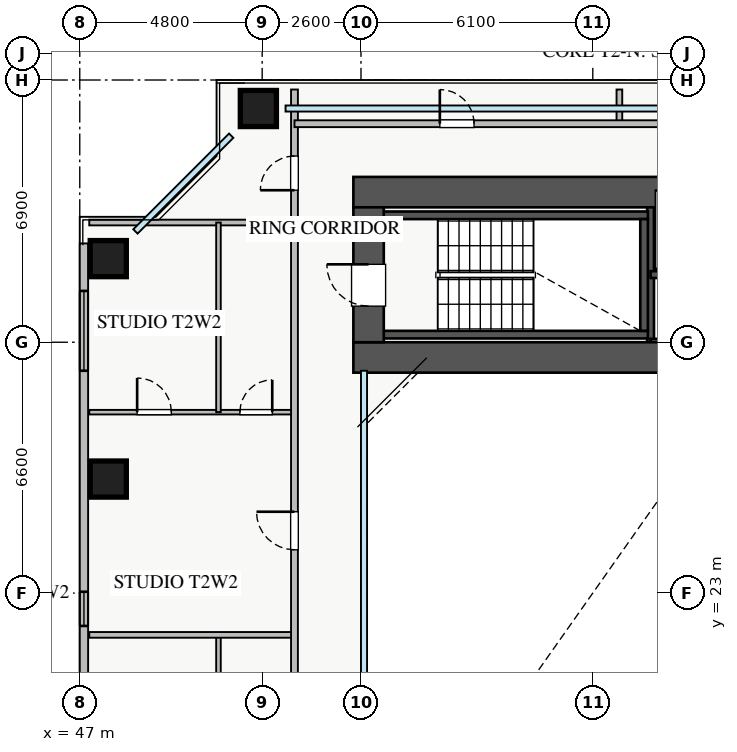
"""IFC4 building model, lengths in metres.
Left out: names, types, materials, properties, quantities, classifications, styles, units other than length and angle.
Written with IfcOpenShell. Run it as: python <this file> out.ifc"""

import sys

from ifc_helpers import new_model, si_unit, direction, frame, frame_2d, origin, origin_2d, place, context, subcontext, project, spatial, rectangle, extrude, source, transform, mapped, element, fill, save


model = new_model("IFC4")
c1 = context("Model", 3, precision=1e-05, world=origin(), true_north=direction((0.0, 1.0)))
c2 = subcontext(c1, "Body", "Model", "MODEL_VIEW")
j1 = project(units=[si_unit("LENGTHUNIT", "METRE"), si_unit("PLANEANGLEUNIT", "RADIAN")], contexts=[c1])
p1 = place(None, origin())
s1 = spatial("IfcSite", under=j1, at=p1, CompositionType="ELEMENT")
p2 = place(p1, origin())
s2 = spatial("IfcBuilding", under=s1, at=p2, CompositionType="ELEMENT")
p3 = place(p2, frame((0.0, 0.0, 26.25)))
s3 = spatial("IfcBuildingStorey", under=s2, at=p3, CompositionType="ELEMENT", Elevation=26.25)
p4 = place(p3, frame((62.02, 29.6, 0.0), z_axis=(0.0, 0.0, 1.0), x_axis=(0.0, 1.0, 0.0)))
e1 = element("IfcWall", 1, at=p4, inside=s3, PredefinedType="SHEAR", context=c2, shape_type="SweptSolid", body=[
    extrude(rectangle(XDim=3.95, YDim=0.18, at=frame_2d((1.975, 0.0))), origin(), (0.0, 0.0, 1.0), 3.07),
])
for number, where, z_axis, x_axis in (
    (2, (62.02, 31.38, 0.0), (0.0, 0.0, 1.0), (1.0, 0.0, 0.0)),
    (3, (62.02, 29.6, 0.0), (0.0, 0.0, 1.0), (1.0, 0.0, 0.0)),
):
    element("IfcWall", number, at=place(p3, frame(where, z_axis=z_axis, x_axis=x_axis)), inside=s3, PredefinedType="SHEAR", context=c2, shape_type="SweptSolid", body=[
        extrude(rectangle(XDim=1.86, YDim=0.18, at=frame_2d((0.93, 0.0))), origin(), (0.0, 0.0, 1.0), 3.07),
    ])
for number, where, z_axis, x_axis in (
    (4, (54.8, 29.8, 0.0), (0.0, 0.0, 1.0), (1.0, 0.0, 0.0)),
    (5, (54.8, 32.94, 0.0), (0.0, 0.0, 1.0), (1.0, 0.0, 0.0)),
):
    element("IfcWall", number, at=place(p3, frame(where, z_axis=z_axis, x_axis=x_axis)), inside=s3, PredefinedType="SHEAR", context=c2, shape_type="SweptSolid", body=[
        extrude(rectangle(XDim=7.15, YDim=0.2, at=frame_2d((3.575, 0.0))), origin(), (0.0, 0.0, 1.0), 3.25),
    ])
p5 = place(p3, frame((61.85, 29.9, 0.0), z_axis=(0.0, 0.0, 1.0), x_axis=(0.0, 1.0, 0.0)))
e6 = element("IfcWall", 6, at=p5, inside=s3, PredefinedType="SHEAR", context=c2, shape_type="SweptSolid", body=[
    extrude(rectangle(XDim=2.94, YDim=0.2, at=frame_2d((1.47, 0.0))), origin(), (0.0, 0.0, 1.0), 3.25),
])
p6 = place(p3, frame((54.2, 29.2, 0.0), z_axis=(0.0, 0.0, 1.0), x_axis=(1.0, 0.0, 0.0)))
e7 = element("IfcWall", 7, at=p6, inside=s3, PredefinedType="SHEAR", context=c2, shape_type="SweptSolid", body=[
    extrude(rectangle(XDim=12.6, YDim=0.8, at=frame_2d((6.3, 0.0))), origin(), (0.0, 0.0, 1.0), 3.25),
])
p7 = place(p3, frame((54.2, 33.55, 0.0), z_axis=(0.0, 0.0, 1.0), x_axis=(1.0, 0.0, 0.0)))
e8 = element("IfcWall", 8, at=p7, inside=s3, PredefinedType="SHEAR", context=c2, shape_type="SweptSolid", body=[
    extrude(rectangle(XDim=12.6, YDim=0.8, at=frame_2d((6.3, 0.0))), origin(), (0.0, 0.0, 1.0), 3.25),
])
p8 = place(p7, frame((8.2, 0.0, 0.0)))
e9 = element("IfcOpeningElement", 9, at=p8, cuts=e8, PredefinedType="OPENING", context=c2, shape_type="SweptSolid", body=[
    extrude(rectangle(XDim=1.1, YDim=2.05, at=frame_2d((0.55, 1.025))), frame((0.0, 0.41, 0.0), z_axis=(0.0, -1.0, 0.0), x_axis=(1.0, 0.0, 0.0)), (0.0, 0.0, 1.0), 0.82),
])
p9 = place(p3, frame((54.6, 29.6, 0.0), z_axis=(0.0, 0.0, 1.0), x_axis=(0.0, 1.0, 0.0)))
e10 = element("IfcWall", 10, at=p9, inside=s3, PredefinedType="SHEAR", context=c2, shape_type="SweptSolid", body=[
    extrude(rectangle(XDim=3.55, YDim=0.8, at=frame_2d((1.775, 0.0))), origin(), (0.0, 0.0, 1.0), 3.25),
])
p10 = place(p9, frame((0.95, 0.0, 0.0)))
e11 = element("IfcOpeningElement", 11, at=p10, cuts=e10, PredefinedType="OPENING", context=c2, shape_type="SweptSolid", body=[
    extrude(rectangle(XDim=1.1, YDim=2.05, at=frame_2d((0.55, 1.025))), frame((0.0, 0.41, 0.0), z_axis=(0.0, -1.0, 0.0), x_axis=(1.0, 0.0, 0.0)), (0.0, 0.0, 1.0), 0.82),
])
m1 = source(origin(), c2, "Body", "SweptSolid", [
    extrude(rectangle(XDim=0.95, YDim=0.95, at=origin_2d()), origin(), (0.0, 0.0, 1.0), 3.25),
])
for number, where, z_axis, x_axis in (
    (12, (51.7, 35.75, 0.0), (0.0, 0.0, 1.0), (1.0, 0.0, 0.0)),
    (13, (47.75, 26.0, 0.0), (0.0, 0.0, 1.0), (1.0, 0.0, 0.0)),
    (14, (47.75, 31.8, 0.0), (0.0, 0.0, 1.0), (1.0, 0.0, 0.0)),
):
    element("IfcColumn", number, at=place(p3, frame(where, z_axis=z_axis, x_axis=x_axis)), inside=s3, PredefinedType="COLUMN", context=c2, shape_type="MappedRepresentation", body=[
        mapped(m1, transform((0.0, 0.0, 0.0), x_axis=(1.0, 0.0, 0.0), y_axis=(0.0, 1.0, 0.0), z_axis=(0.0, 0.0, 1.0), scale=1.0)),
    ])
p11 = place(p3, frame((47.11, 13.8, 0.0), z_axis=(0.0, 0.0, 1.0), x_axis=(0.0, 1.0, 0.0)))
e15 = element("IfcWall", 15, at=p11, inside=s3, PredefinedType="STANDARD", context=c2, shape_type="SweptSolid", body=[
    extrude(rectangle(XDim=18.4, YDim=0.22, at=frame_2d((9.2, 0.0))), origin(), (0.0, 0.0, 1.0), 2.61),
])
p12 = place(p11, frame((1.1, 0.0, 0.9)))
e16 = element("IfcOpeningElement", 16, at=p12, cuts=e15, PredefinedType="OPENING", context=c2, shape_type="SweptSolid", body=[
    extrude(rectangle(XDim=2.4, YDim=1.48, at=frame_2d((1.2, 0.74))), frame((0.0, 0.12, 0.0), z_axis=(0.0, -1.0, 0.0), x_axis=(1.0, 0.0, 0.0)), (0.0, 0.0, 1.0), 0.24),
])
p13 = place(p11, frame((15.05, 0.0, 0.9)))
e17 = element("IfcOpeningElement", 17, at=p13, cuts=e15, PredefinedType="OPENING", context=c2, shape_type="SweptSolid", body=[
    extrude(rectangle(XDim=2.1, YDim=1.48, at=frame_2d((1.05, 0.74))), frame((0.0, 0.12, 0.0), z_axis=(0.0, -1.0, 0.0), x_axis=(1.0, 0.0, 0.0)), (0.0, 0.0, 1.0), 0.24),
])
p14 = place(p11, frame((8.335, 0.0, 0.9)))
e18 = element("IfcOpeningElement", 18, at=p14, cuts=e15, PredefinedType="OPENING", context=c2, shape_type="SweptSolid", body=[
    extrude(rectangle(XDim=0.9, YDim=1.2, at=frame_2d((0.45, 0.6))), frame((0.0, 0.12, 0.0), z_axis=(0.0, -1.0, 0.0), x_axis=(1.0, 0.0, 0.0)), (0.0, 0.0, 1.0), 0.24),
])
p15 = place(p3, frame((47.25, 32.75, 0.0), z_axis=(0.0, 0.0, 1.0), x_axis=(1.0, 0.0, 0.0)))
e19 = element("IfcWall", 19, at=p15, inside=s3, PredefinedType="PARTITIONING", context=c2, shape_type="SweptSolid", body=[
    extrude(rectangle(XDim=5.4, YDim=0.15, at=frame_2d((2.7, 0.0))), origin(), (0.0, 0.0, 1.0), 3.07),
])
p16 = place(p3, frame((50.65, 17.92, 0.0), z_axis=(0.0, 0.0, 1.0), x_axis=(0.0, 1.0, 0.0)))
e20 = element("IfcWall", 20, at=p16, inside=s3, PredefinedType="PLUMBINGWALL", context=c2, shape_type="SweptSolid", body=[
    extrude(rectangle(XDim=3.98, YDim=0.12, at=frame_2d((1.99, 0.0))), origin(), (0.0, 0.0, 1.0), 3.07),
])
p17 = place(p3, frame((47.25, 27.76, 0.0), z_axis=(0.0, 0.0, 1.0), x_axis=(1.0, 0.0, 0.0)))
e21 = element("IfcWall", 21, at=p17, inside=s3, PredefinedType="PLUMBINGWALL", context=c2, shape_type="SweptSolid", body=[
    extrude(rectangle(XDim=5.4, YDim=0.12, at=frame_2d((2.7, 0.0))), origin(), (0.0, 0.0, 1.0), 3.07),
])
p18 = place(p17, frame((1.26, 0.0, 0.0)))
e22 = element("IfcOpeningElement", 22, at=p18, cuts=e21, PredefinedType="OPENING", context=c2, shape_type="SweptSolid", body=[
    extrude(rectangle(XDim=0.9, YDim=2.05, at=frame_2d((0.45, 1.025))), frame((0.0, 0.07, 0.0), z_axis=(0.0, -1.0, 0.0), x_axis=(1.0, 0.0, 0.0)), (0.0, 0.0, 1.0), 0.14),
])
p19 = place(p17, frame((3.965, 0.0, 0.0)))
e23 = element("IfcOpeningElement", 23, at=p19, cuts=e21, PredefinedType="OPENING", context=c2, shape_type="SweptSolid", body=[
    extrude(rectangle(XDim=0.85, YDim=2.05, at=frame_2d((0.425, 1.025))), frame((0.0, 0.07, 0.0), z_axis=(0.0, -1.0, 0.0), x_axis=(1.0, 0.0, 0.0)), (0.0, 0.0, 1.0), 0.14),
])
p20 = place(p3, frame((50.65, 27.76, 0.0), z_axis=(0.0, 0.0, 1.0), x_axis=(0.0, 1.0, 0.0)))
e24 = element("IfcWall", 24, at=p20, inside=s3, PredefinedType="PLUMBINGWALL", context=c2, shape_type="SweptSolid", body=[
    extrude(rectangle(XDim=4.99, YDim=0.12, at=frame_2d((2.495, 0.0))), origin(), (0.0, 0.0, 1.0), 3.07),
])
p21 = place(p3, frame((47.25, 21.9, 0.0), z_axis=(0.0, 0.0, 1.0), x_axis=(1.0, 0.0, 0.0)))
e25 = element("IfcWall", 25, at=p21, inside=s3, PredefinedType="PARTITIONING", context=c2, shape_type="SweptSolid", body=[
    extrude(rectangle(XDim=5.4, YDim=0.15, at=frame_2d((2.7, 0.0))), origin(), (0.0, 0.0, 1.0), 3.07),
])
p22 = place(p3, frame((52.65, 9.75, 0.0), z_axis=(0.0, 0.0, 1.0), x_axis=(0.0, 1.0, 0.0)))
e26 = element("IfcWall", 26, at=p22, inside=s3, PredefinedType="PARTITIONING", context=c2, shape_type="SweptSolid", body=[
    extrude(rectangle(XDim=26.5, YDim=0.18, at=frame_2d((13.25, 0.0))), origin(), (0.0, 0.0, 1.0), 3.07),
])
p23 = place(p22, frame((23.85, 0.0, 0.0)))
e27 = element("IfcOpeningElement", 27, at=p23, cuts=e26, PredefinedType="OPENING", context=c2, shape_type="SweptSolid", body=[
    extrude(rectangle(XDim=0.9, YDim=2.05, at=frame_2d((0.45, 1.025))), frame((0.0, 0.1, 0.0), z_axis=(0.0, -1.0, 0.0), x_axis=(1.0, 0.0, 0.0)), (0.0, 0.0, 1.0), 0.2),
])
p24 = place(p22, frame((1.75, 0.0, 0.0)))
e28 = element("IfcOpeningElement", 28, at=p24, cuts=e26, PredefinedType="OPENING", context=c2, shape_type="SweptSolid", body=[
    extrude(rectangle(XDim=0.9, YDim=2.05, at=frame_2d((0.45, 1.025))), frame((0.0, 0.1, 0.0), z_axis=(0.0, -1.0, 0.0), x_axis=(1.0, 0.0, 0.0)), (0.0, 0.0, 1.0), 0.2),
])
p25 = place(p22, frame((5.145, 0.0, 0.0)))
e29 = element("IfcOpeningElement", 29, at=p25, cuts=e26, PredefinedType="OPENING", context=c2, shape_type="SweptSolid", body=[
    extrude(rectangle(XDim=1.0, YDim=2.05, at=frame_2d((0.5, 1.025))), frame((0.0, 0.1, 0.0), z_axis=(0.0, -1.0, 0.0), x_axis=(1.0, 0.0, 0.0)), (0.0, 0.0, 1.0), 0.2),
])
p26 = place(p22, frame((14.39, 0.0, 0.0)))
e30 = element("IfcOpeningElement", 30, at=p26, cuts=e26, PredefinedType="OPENING", context=c2, shape_type="SweptSolid", body=[
    extrude(rectangle(XDim=1.0, YDim=2.05, at=frame_2d((0.5, 1.025))), frame((0.0, 0.1, 0.0), z_axis=(0.0, -1.0, 0.0), x_axis=(1.0, 0.0, 0.0)), (0.0, 0.0, 1.0), 0.2),
])
p27 = place(p3, frame((61.2, 35.35, 0.0), z_axis=(0.0, 0.0, 1.0), x_axis=(0.0, 1.0, 0.0)))
e31 = element("IfcWall", 31, at=p27, inside=s3, PredefinedType="PARTITIONING", context=c2, shape_type="SweptSolid", body=[
    extrude(rectangle(XDim=0.9, YDim=0.15, at=frame_2d((0.45, 0.0))), origin(), (0.0, 0.0, 1.0), 3.07),
])
p28 = place(p3, frame((52.65, 35.35, 0.0), z_axis=(0.0, 0.0, 1.0), x_axis=(1.0, 0.0, 0.0)))
e32 = element("IfcWall", 32, at=p28, inside=s3, PredefinedType="PARTITIONING", context=c2, shape_type="SweptSolid", body=[
    extrude(rectangle(XDim=17.0, YDim=0.18, at=frame_2d((8.5, 0.0))), origin(), (0.0, 0.0, 1.0), 3.07),
])
p29 = place(p28, frame((3.825, 0.0, 0.0)))
e33 = element("IfcOpeningElement", 33, at=p29, cuts=e32, PredefinedType="OPENING", context=c2, shape_type="SweptSolid", body=[
    extrude(rectangle(XDim=0.9, YDim=2.05, at=frame_2d((0.45, 1.025))), frame((0.0, 0.1, 0.0), z_axis=(0.0, -1.0, 0.0), x_axis=(1.0, 0.0, 0.0)), (0.0, 0.0, 1.0), 0.2),
])
p30 = place(p28, frame((12.325, 0.0, 0.0)))
e34 = element("IfcOpeningElement", 34, at=p30, cuts=e32, PredefinedType="OPENING", context=c2, shape_type="SweptSolid", body=[
    extrude(rectangle(XDim=0.9, YDim=2.05, at=frame_2d((0.45, 1.025))), frame((0.0, 0.1, 0.0), z_axis=(0.0, -1.0, 0.0), x_axis=(1.0, 0.0, 0.0)), (0.0, 0.0, 1.0), 0.2),
])
m2 = source(origin(), c2, "Body", "SweptSolid", [
    extrude(rectangle(XDim=2.1, YDim=1.48, at=frame_2d((1.05, 0.74))), frame((0.0, 0.03, 0.0), z_axis=(0.0, -1.0, 0.0), x_axis=(1.0, 0.0, 0.0)), (0.0, 0.0, 1.0), 0.06),
])
p31 = place(p13, origin())
e35 = element("IfcWindow", 35, at=p31, inside=s3, PartitioningType="TRIPLE_PANEL_VERTICAL", PredefinedType="WINDOW", context=c2, shape_type="MappedRepresentation", body=[
    mapped(m2, transform((0.0, 0.0, 0.0), x_axis=(1.0, 0.0, 0.0), y_axis=(0.0, 1.0, 0.0), z_axis=(0.0, 0.0, 1.0), scale=1.0)),
])
fill(e17, e35)
m3 = source(origin(), c2, "Body", "SweptSolid", [
    extrude(rectangle(XDim=1.1, YDim=2.05, at=frame_2d((0.55, 1.025))), frame((0.0, 0.025, 0.0), z_axis=(0.0, -1.0, 0.0), x_axis=(1.0, 0.0, 0.0)), (0.0, 0.0, 1.0), 0.05),
])
p32 = place(p10, origin())
e36 = element("IfcDoor", 36, at=p32, inside=s3, OperationType="SINGLE_SWING_RIGHT", PredefinedType="DOOR", context=c2, shape_type="MappedRepresentation", body=[
    mapped(m3, transform((0.0, 0.0, 0.0), x_axis=(1.0, 0.0, 0.0), y_axis=(0.0, 1.0, 0.0), z_axis=(0.0, 0.0, 1.0), scale=1.0)),
])
fill(e11, e36)
m4 = source(origin(), c2, "Body", "SweptSolid", [
    extrude(rectangle(XDim=0.9, YDim=2.05, at=frame_2d((0.45, 1.025))), frame((0.0, 0.025, 0.0), z_axis=(0.0, -1.0, 0.0), x_axis=(1.0, 0.0, 0.0)), (0.0, 0.0, 1.0), 0.05),
])
p33 = place(p18, origin())
e37 = element("IfcDoor", 37, at=p33, inside=s3, OperationType="SINGLE_SWING_LEFT", PredefinedType="DOOR", context=c2, shape_type="MappedRepresentation", body=[
    mapped(m4, transform((0.0, 0.0, 0.0), x_axis=(1.0, 0.0, 0.0), y_axis=(0.0, 1.0, 0.0), z_axis=(0.0, 0.0, 1.0), scale=1.0)),
])
fill(e22, e37)
m5 = source(origin(), c2, "Body", "SweptSolid", [
    extrude(rectangle(XDim=0.85, YDim=2.05, at=frame_2d((0.425, 1.025))), frame((0.0, 0.025, 0.0), z_axis=(0.0, -1.0, 0.0), x_axis=(1.0, 0.0, 0.0)), (0.0, 0.0, 1.0), 0.05),
])
p34 = place(p19, origin())
e38 = element("IfcDoor", 38, at=p34, inside=s3, OperationType="SINGLE_SWING_RIGHT", PredefinedType="DOOR", context=c2, shape_type="MappedRepresentation", body=[
    mapped(m5, transform((0.0, 0.0, 0.0), x_axis=(1.0, 0.0, 0.0), y_axis=(0.0, 1.0, 0.0), z_axis=(0.0, 0.0, 1.0), scale=1.0)),
])
fill(e23, e38)
p35 = place(p23, origin())
e39 = element("IfcDoor", 39, at=p35, inside=s3, OperationType="SINGLE_SWING_LEFT", PredefinedType="DOOR", context=c2, shape_type="MappedRepresentation", body=[
    mapped(m4, transform((0.0, 0.0, 0.0), x_axis=(1.0, 0.0, 0.0), y_axis=(0.0, 1.0, 0.0), z_axis=(0.0, 0.0, 1.0), scale=1.0)),
])
fill(e27, e39)
m6 = source(origin(), c2, "Body", "SweptSolid", [
    extrude(rectangle(XDim=1.0, YDim=2.05, at=frame_2d((0.5, 1.025))), frame((0.0, 0.025, 0.0), z_axis=(0.0, -1.0, 0.0), x_axis=(1.0, 0.0, 0.0)), (0.0, 0.0, 1.0), 0.05),
])
p36 = place(p26, origin())
e40 = element("IfcDoor", 40, at=p36, inside=s3, OperationType="SINGLE_SWING_RIGHT", PredefinedType="DOOR", context=c2, shape_type="MappedRepresentation", body=[
    mapped(m6, transform((0.0, 0.0, 0.0), x_axis=(1.0, 0.0, 0.0), y_axis=(0.0, 1.0, 0.0), z_axis=(0.0, 0.0, 1.0), scale=1.0)),
])
fill(e30, e40)
p37 = place(p29, origin())
e41 = element("IfcDoor", 41, at=p37, inside=s3, OperationType="SINGLE_SWING_LEFT", PredefinedType="DOOR", context=c2, shape_type="MappedRepresentation", body=[
    mapped(m4, transform((0.0, 0.0, 0.0), x_axis=(1.0, 0.0, 0.0), y_axis=(0.0, 1.0, 0.0), z_axis=(0.0, 0.0, 1.0), scale=1.0)),
])
fill(e33, e41)
m7 = source(origin(), c2, "Body", "SweptSolid", [
    extrude(rectangle(XDim=0.9, YDim=1.2, at=frame_2d((0.45, 0.6))), frame((0.0, 0.03, 0.0), z_axis=(0.0, -1.0, 0.0), x_axis=(1.0, 0.0, 0.0)), (0.0, 0.0, 1.0), 0.06),
])
p38 = place(p14, origin())
e42 = element("IfcWindow", 42, at=p38, inside=s3, PartitioningType="SINGLE_PANEL", PredefinedType="WINDOW", context=c2, shape_type="MappedRepresentation", body=[
    mapped(m7, transform((0.0, 0.0, 0.0), x_axis=(1.0, 0.0, 0.0), y_axis=(0.0, 1.0, 0.0), z_axis=(0.0, 0.0, 1.0), scale=1.0)),
])
fill(e18, e42)
save(model, sys.argv[1])
